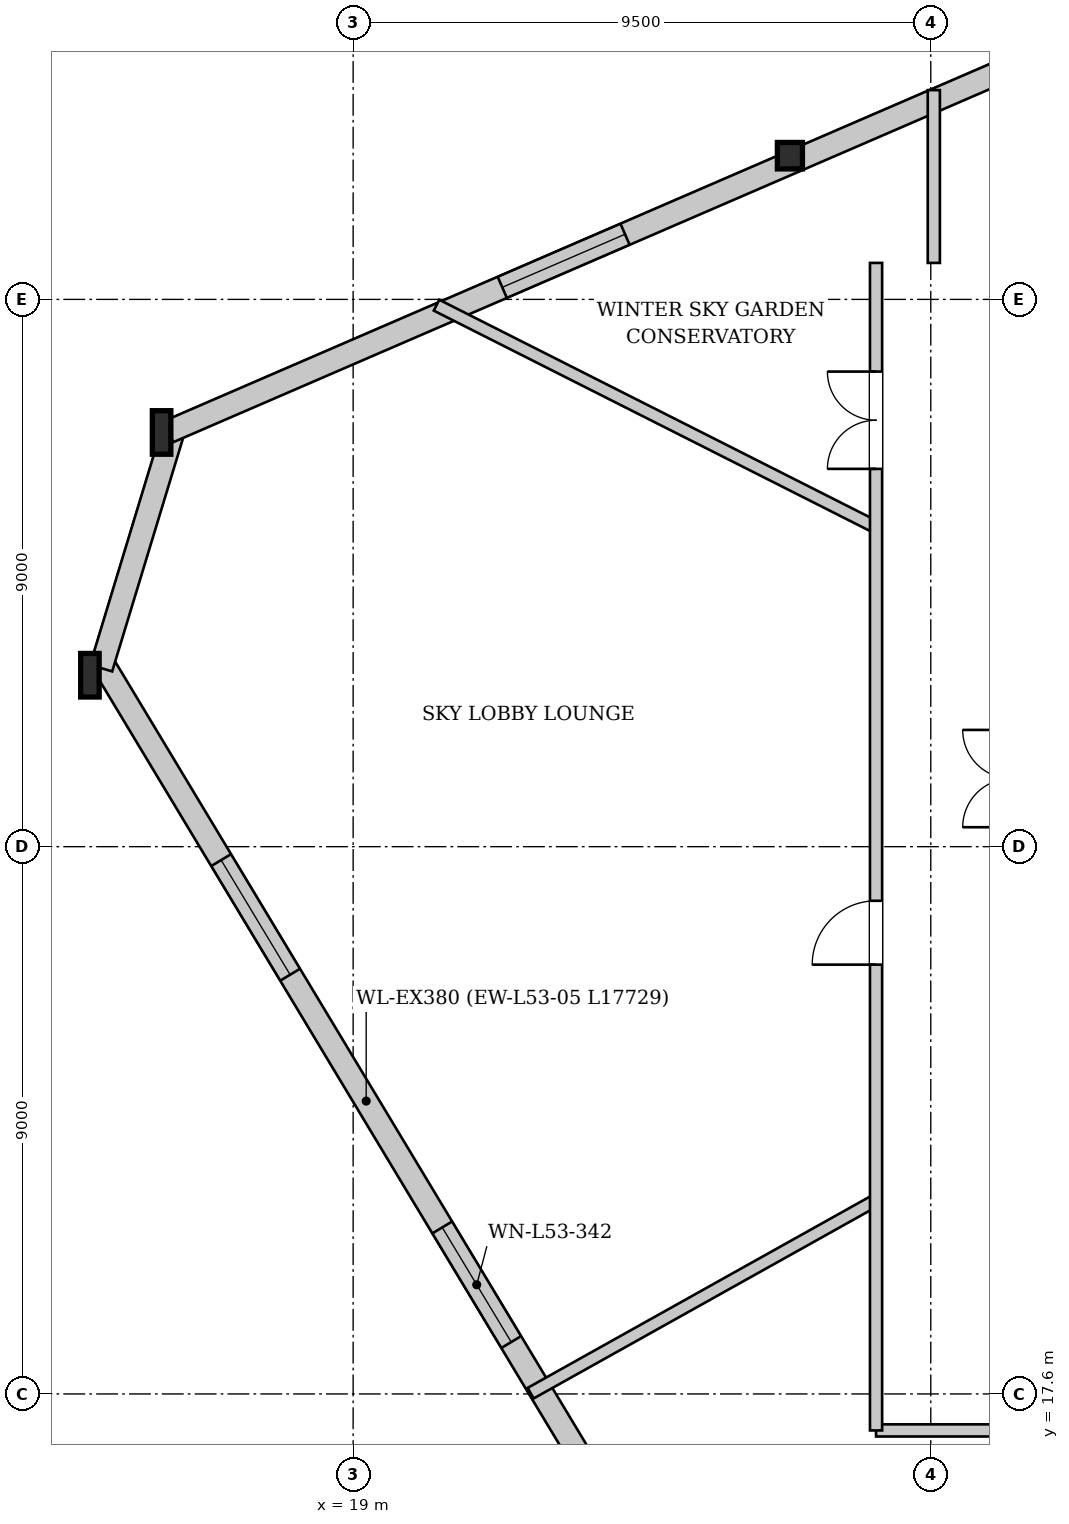
"""IFC4 building model, lengths in metres.
Left out: names, types, materials, properties, quantities, classifications, styles, units other than length and angle.
Written with IfcOpenShell. Run it as: python <this file> out.ifc"""

import sys

from ifc_helpers import new_model, si_unit, direction, frame, frame_2d, origin, origin_2d, place, context, subcontext, project, spatial, rectangle, i_section, extrude, source, transform, mapped, element, fill, save


model = new_model("IFC4")
c1 = context("Model", 3, precision=1e-05, world=origin(), true_north=direction((0.0, 1.0)))
c2 = subcontext(c1, "Body", "Model", "MODEL_VIEW")
j1 = project(units=[si_unit("LENGTHUNIT", "METRE"), si_unit("PLANEANGLEUNIT", "RADIAN")], contexts=[c1])
p1 = place(None, origin())
s1 = spatial("IfcSite", under=j1, at=p1, CompositionType="ELEMENT")
p2 = place(p1, origin())
s2 = spatial("IfcBuilding", under=s1, at=p2, CompositionType="ELEMENT")
p3 = place(p2, frame((0.0, 0.0, 200.3)))
s3 = spatial("IfcBuildingStorey", under=s2, at=p3, CompositionType="ELEMENT", Elevation=200.3)
m1 = source(origin(), c2, "Body", "SweptSolid", [
    extrude(i_section(OverallWidth=0.412, OverallDepth=0.435, WebThickness=0.031, FlangeThickness=0.05, at=origin_2d()), origin(), (0.0, 0.0, 1.0), 3.846),
])
p4 = place(p3, frame((26.262, 38.085, 0.0), z_axis=(-0.041008756357, -0.063163641757, 0.997160286144), x_axis=(0.838732381967, -0.544543837941, 0.0)))
e1 = element("IfcColumn", 1, at=p4, inside=s3, PredefinedType="COLUMN", context=c2, shape_type="MappedRepresentation", body=[
    mapped(m1, transform((0.0, 0.0, 0.0), x_axis=(1.0, 0.0, 0.0), y_axis=(0.0, 1.0, 0.0), z_axis=(0.0, 0.0, 1.0), scale=1.0)),
])
m2 = source(origin(), c2, "Body", "SweptSolid", [
    extrude(i_section(OverallWidth=0.304, OverallDepth=0.716, WebThickness=0.021, FlangeThickness=0.04, at=origin_2d()), origin(), (0.0, 0.0, 1.0), 3.854),
])
p5 = place(p3, frame((15.891, 33.601, 0.0), z_axis=(-0.021409189908, -0.097988215347, 0.994957263525), x_axis=(0.976953544828, -0.213452035004, 0.0)))
e2 = element("IfcColumn", 2, at=p5, inside=s3, PredefinedType="COLUMN", context=c2, shape_type="MappedRepresentation", body=[
    mapped(m2, transform((0.0, 0.0, 0.0), x_axis=(1.0, 0.0, 0.0), y_axis=(0.0, 1.0, 0.0), z_axis=(0.0, 0.0, 1.0), scale=1.0)),
])
m3 = source(origin(), c2, "Body", "SweptSolid", [
    extrude(i_section(OverallWidth=0.304, OverallDepth=0.716, WebThickness=0.021, FlangeThickness=0.04, at=origin_2d()), origin(), (0.0, 0.0, 1.0), 3.851),
])
p6 = place(p3, frame((14.673, 29.592, 0.0), z_axis=(-0.001268108038, -0.089655238273, 0.995972052897), x_axis=(0.999899984797, -0.014142856928, 0.0)))
e3 = element("IfcColumn", 3, at=p6, inside=s3, PredefinedType="COLUMN", context=c2, shape_type="MappedRepresentation", body=[
    mapped(m3, transform((0.0, 0.0, 0.0), x_axis=(1.0, 0.0, 0.0), y_axis=(0.0, 1.0, 0.0), z_axis=(0.0, 0.0, 1.0), scale=1.0)),
])
p7 = place(p3, frame((23.979, 14.5, 0.0), z_axis=(0.0, 0.0, 1.0), x_axis=(-0.515702182495, 0.856767914298, 0.0)))
e4 = element("IfcWall", 4, at=p7, inside=s3, PredefinedType="SOLIDWALL", context=c2, shape_type="SweptSolid", body=[
    extrude(rectangle(XDim=17.729, YDim=0.38, at=frame_2d((8.865, 0.0))), origin(), (0.0, 0.0, 1.0), 2.972),
])
p8 = place(p7, frame((4.614, 0.0, 0.602)))
e5 = element("IfcOpeningElement", 5, at=p8, cuts=e4, PredefinedType="OPENING", context=c2, shape_type="SweptSolid", body=[
    extrude(rectangle(XDim=2.2, YDim=2.25, at=frame_2d((1.1, 1.125))), frame((0.0, 0.2, 0.0), z_axis=(0.0, -1.0, 0.0), x_axis=(1.0, 0.0, 0.0)), (0.0, 0.0, 1.0), 0.4),
])
p9 = place(p7, frame((11.665, 0.0, 0.602)))
e6 = element("IfcOpeningElement", 6, at=p9, cuts=e4, PredefinedType="OPENING", context=c2, shape_type="SweptSolid", body=[
    extrude(rectangle(XDim=2.2, YDim=2.25, at=frame_2d((1.1, 1.125))), frame((0.0, 0.2, 0.0), z_axis=(0.0, -1.0, 0.0), x_axis=(1.0, 0.0, 0.0)), (0.0, 0.0, 1.0), 0.4),
])
p10 = place(p3, frame((14.855, 29.537, 0.0), z_axis=(0.0, 0.0, 1.0), x_axis=(0.29062357324, 0.956837467221, 0.0)))
e7 = element("IfcWall", 7, at=p10, inside=s3, PredefinedType="SOLIDWALL", context=c2, shape_type="SweptSolid", body=[
    extrude(rectangle(XDim=4.189, YDim=0.38, at=frame_2d((2.095, 0.0))), origin(), (0.0, 0.0, 1.0), 2.972),
])
p11 = place(p3, frame((15.966, 33.426, 0.0), z_axis=(0.0, 0.0, 1.0), x_axis=(0.917865013835, 0.396892701341, 0.0)))
e8 = element("IfcWall", 8, at=p11, inside=s3, PredefinedType="SOLIDWALL", context=c2, shape_type="SweptSolid", body=[
    extrude(rectangle(XDim=22.598, YDim=0.38, at=frame_2d((11.299, 0.0))), origin(), (0.0, 0.0, 1.0), 2.972),
])
p12 = place(p11, frame((5.977, 0.0, 0.602)))
e9 = element("IfcOpeningElement", 9, at=p12, cuts=e8, PredefinedType="OPENING", context=c2, shape_type="SweptSolid", body=[
    extrude(rectangle(XDim=2.2, YDim=2.25, at=frame_2d((1.1, 1.125))), frame((0.0, 0.2, 0.0), z_axis=(0.0, -1.0, 0.0), x_axis=(1.0, 0.0, 0.0)), (0.0, 0.0, 1.0), 0.4),
])
p13 = place(p11, frame((16.27, 0.0, 0.602)))
e10 = element("IfcOpeningElement", 10, at=p13, cuts=e8, PredefinedType="OPENING", context=c2, shape_type="SweptSolid", body=[
    extrude(rectangle(XDim=2.2, YDim=2.25, at=frame_2d((1.1, 1.125))), frame((0.0, 0.2, 0.0), z_axis=(0.0, -1.0, 0.0), x_axis=(1.0, 0.0, 0.0)), (0.0, 0.0, 1.0), 0.4),
])
p14 = place(p3, frame((27.6, 31.854, 0.0), z_axis=(0.0, 0.0, 1.0), x_axis=(-0.892599008616, 0.450851427655, 0.0)))
e11 = element("IfcWall", 11, at=p14, inside=s3, PredefinedType="PARTITIONING", context=c2, shape_type="SweptSolid", body=[
    extrude(rectangle(XDim=8.099, YDim=0.2, at=frame_2d((4.049, 0.0))), origin(), (0.0, 0.0, 1.0), 3.58),
])
p15 = place(p3, frame((27.6, 20.788, 0.0), z_axis=(0.0, 0.0, 1.0), x_axis=(-0.872931735327, -0.487842377678, 0.0)))
e12 = element("IfcWall", 12, at=p15, inside=s3, PredefinedType="PARTITIONING", context=c2, shape_type="SweptSolid", body=[
    extrude(rectangle(XDim=6.508, YDim=0.2, at=frame_2d((3.254, 0.0))), origin(), (0.0, 0.0, 1.0), 3.58),
])
p16 = place(p3, frame((27.6, 17.0, 0.0), z_axis=(0.0, 0.0, 1.0), x_axis=(1.0, 0.0, 0.0)))
e13 = element("IfcWall", 13, at=p16, inside=s3, PredefinedType="PARTITIONING", context=c2, shape_type="SweptSolid", body=[
    extrude(rectangle(XDim=20.8, YDim=0.2, at=frame_2d((10.4, 0.0))), origin(), (0.0, 0.0, 1.0), 3.58),
])
p17 = place(p16, frame((4.254, 0.0, 0.0)))
e14 = element("IfcOpeningElement", 14, at=p17, cuts=e13, PredefinedType="OPENING", context=c2, shape_type="SweptSolid", body=[
    extrude(rectangle(XDim=1.05, YDim=2.2, at=frame_2d((0.525, 1.1))), frame((0.0, 0.11, 0.0), z_axis=(0.0, -1.0, 0.0), x_axis=(1.0, 0.0, 0.0)), (0.0, 0.0, 1.0), 0.22),
])
p18 = place(p16, frame((12.791, 0.0, 0.0)))
e15 = element("IfcOpeningElement", 15, at=p18, cuts=e13, PredefinedType="OPENING", context=c2, shape_type="SweptSolid", body=[
    extrude(rectangle(XDim=1.05, YDim=2.2, at=frame_2d((0.525, 1.1))), frame((0.0, 0.11, 0.0), z_axis=(0.0, -1.0, 0.0), x_axis=(1.0, 0.0, 0.0)), (0.0, 0.0, 1.0), 0.22),
])
p19 = place(p3, frame((27.6, 17.0, 0.0), z_axis=(0.0, 0.0, 1.0), x_axis=(0.0, 1.0, 0.0)))
e16 = element("IfcWall", 16, at=p19, inside=s3, PredefinedType="PARTITIONING", context=c2, shape_type="SweptSolid", body=[
    extrude(rectangle(XDim=19.2, YDim=0.2, at=frame_2d((9.6, 0.0))), origin(), (0.0, 0.0, 1.0), 3.58),
])
p20 = place(p19, frame((15.813, 0.0, 0.0)))
e17 = element("IfcOpeningElement", 17, at=p20, cuts=e16, PredefinedType="OPENING", context=c2, shape_type="SweptSolid", body=[
    extrude(rectangle(XDim=1.6, YDim=2.2, at=frame_2d((0.8, 1.1))), frame((0.0, 0.11, 0.0), z_axis=(0.0, -1.0, 0.0), x_axis=(1.0, 0.0, 0.0)), (0.0, 0.0, 1.0), 0.22),
])
p21 = place(p19, frame((7.66, 0.0, 0.0)))
e18 = element("IfcOpeningElement", 18, at=p21, cuts=e16, PredefinedType="OPENING", context=c2, shape_type="SweptSolid", body=[
    extrude(rectangle(XDim=1.05, YDim=2.2, at=frame_2d((0.525, 1.1))), frame((0.0, 0.11, 0.0), z_axis=(0.0, -1.0, 0.0), x_axis=(1.0, 0.0, 0.0)), (0.0, 0.0, 1.0), 0.22),
])
p22 = place(p3, frame((28.55, 36.2, 0.0), z_axis=(0.0, 0.0, 1.0), x_axis=(0.0, 1.0, 0.0)))
e19 = element("IfcWall", 19, at=p22, inside=s3, PredefinedType="PARTITIONING", context=c2, shape_type="SweptSolid", body=[
    extrude(rectangle(XDim=2.842, YDim=0.2, at=frame_2d((1.421, 0.0))), origin(), (0.0, 0.0, 1.0), 3.58),
])
m4 = source(origin(), c2, "Body", "SweptSolid", [
    extrude(rectangle(XDim=2.2, YDim=2.25, at=frame_2d((1.1, 1.125))), frame((0.0, 0.03, 0.0), z_axis=(0.0, -1.0, 0.0), x_axis=(1.0, 0.0, 0.0)), (0.0, 0.0, 1.0), 0.06),
])
p23 = place(p8, origin())
e20 = element("IfcWindow", 20, at=p23, inside=s3, PartitioningType="SINGLE_PANEL", PredefinedType="WINDOW", context=c2, shape_type="MappedRepresentation", body=[
    mapped(m4, transform((0.0, 0.0, 0.0), x_axis=(1.0, 0.0, 0.0), y_axis=(0.0, 1.0, 0.0), z_axis=(0.0, 0.0, 1.0), scale=1.0)),
])
fill(e5, e20)
p24 = place(p9, origin())
e21 = element("IfcWindow", 21, at=p24, inside=s3, PartitioningType="SINGLE_PANEL", PredefinedType="WINDOW", context=c2, shape_type="MappedRepresentation", body=[
    mapped(m4, transform((0.0, 0.0, 0.0), x_axis=(1.0, 0.0, 0.0), y_axis=(0.0, 1.0, 0.0), z_axis=(0.0, 0.0, 1.0), scale=1.0)),
])
fill(e6, e21)
p25 = place(p12, origin())
e22 = element("IfcWindow", 22, at=p25, inside=s3, PartitioningType="SINGLE_PANEL", PredefinedType="WINDOW", context=c2, shape_type="MappedRepresentation", body=[
    mapped(m4, transform((0.0, 0.0, 0.0), x_axis=(1.0, 0.0, 0.0), y_axis=(0.0, 1.0, 0.0), z_axis=(0.0, 0.0, 1.0), scale=1.0)),
])
fill(e9, e22)
m5 = source(origin(), c2, "Body", "SweptSolid", [
    extrude(rectangle(XDim=1.6, YDim=2.2, at=frame_2d((0.8, 1.1))), frame((0.0, 0.025, 0.0), z_axis=(0.0, -1.0, 0.0), x_axis=(1.0, 0.0, 0.0)), (0.0, 0.0, 1.0), 0.05),
])
p26 = place(p20, origin())
e23 = element("IfcDoor", 23, at=p26, inside=s3, OperationType="DOUBLE_DOOR_SINGLE_SWING", PredefinedType="DOOR", context=c2, shape_type="MappedRepresentation", body=[
    mapped(m5, transform((0.0, 0.0, 0.0), x_axis=(1.0, 0.0, 0.0), y_axis=(0.0, 1.0, 0.0), z_axis=(0.0, 0.0, 1.0), scale=1.0)),
])
fill(e17, e23)
m6 = source(origin(), c2, "Body", "SweptSolid", [
    extrude(rectangle(XDim=1.05, YDim=2.2, at=frame_2d((0.525, 1.1))), frame((0.0, 0.025, 0.0), z_axis=(0.0, -1.0, 0.0), x_axis=(1.0, 0.0, 0.0)), (0.0, 0.0, 1.0), 0.05),
])
p27 = place(p21, origin())
e24 = element("IfcDoor", 24, at=p27, inside=s3, OperationType="SINGLE_SWING_LEFT", PredefinedType="DOOR", context=c2, shape_type="MappedRepresentation", body=[
    mapped(m6, transform((0.0, 0.0, 0.0), x_axis=(1.0, 0.0, 0.0), y_axis=(0.0, 1.0, 0.0), z_axis=(0.0, 0.0, 1.0), scale=1.0)),
])
fill(e18, e24)
save(model, sys.argv[1])
